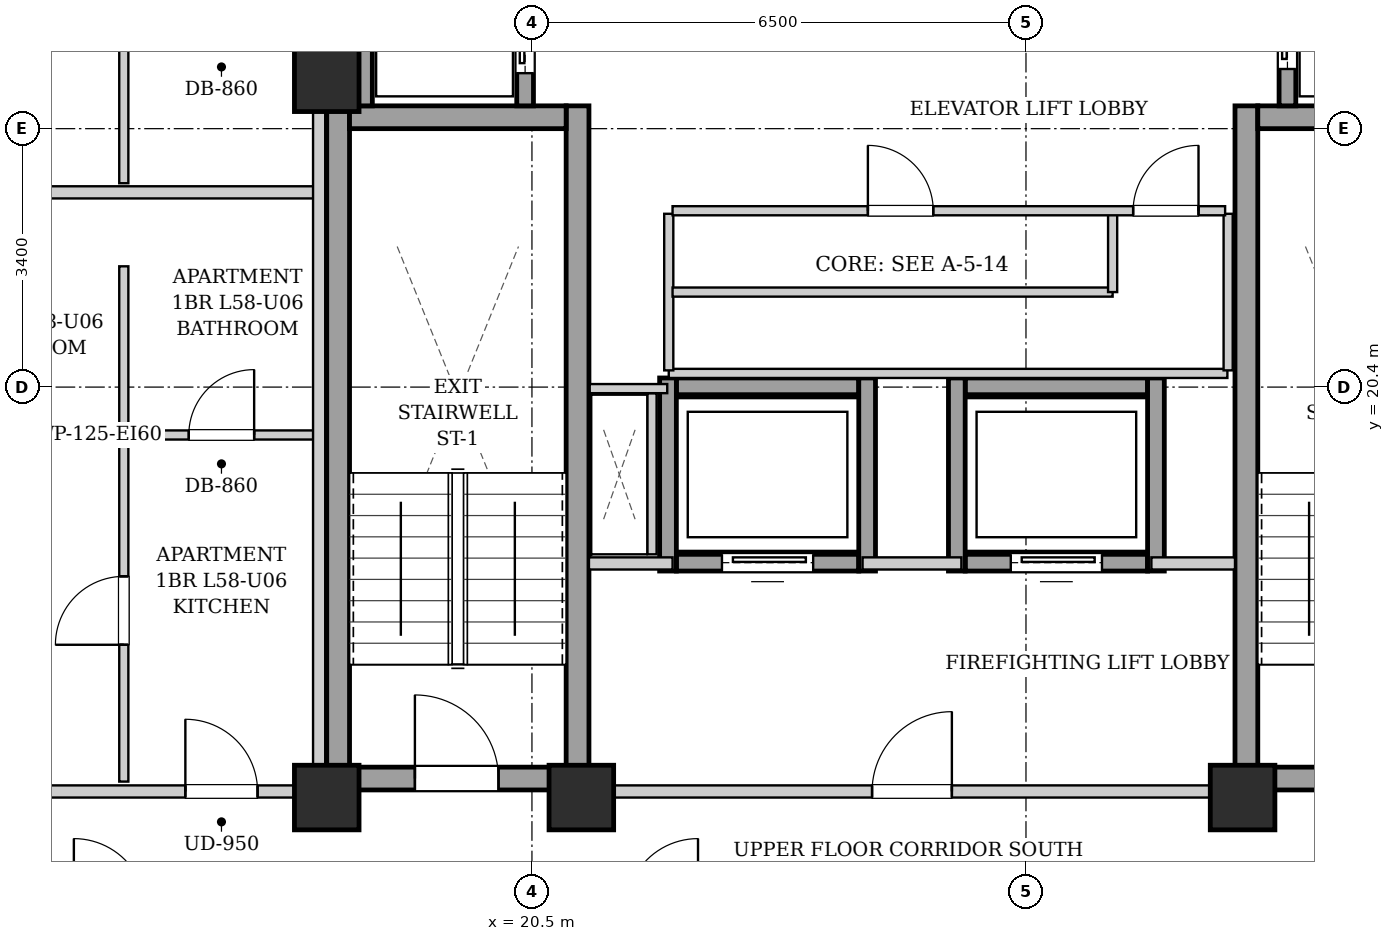
"""IFC4 building model, lengths in metres.
Left out: names, types, materials, properties, quantities, classifications, styles, units other than length and angle.
Written with IfcOpenShell. Run it as: python <this file> out.ifc"""

import sys

from ifc_helpers import new_model, si_unit, direction, frame, frame_2d, origin, origin_2d, place, context, subcontext, project, spatial, rectangle, extrude, element, fill, save


model = new_model("IFC4")
c1 = context("Model", 3, precision=1e-05, world=origin(), true_north=direction((0.0, 1.0)))
c2 = subcontext(c1, "Body", "Model", "MODEL_VIEW")
j1 = project(units=[si_unit("LENGTHUNIT", "METRE"), si_unit("PLANEANGLEUNIT", "RADIAN")], contexts=[c1])
p1 = place(None, origin())
s1 = spatial("IfcSite", under=j1, at=p1, CompositionType="ELEMENT")
p2 = place(p1, origin())
s2 = spatial("IfcBuilding", under=s1, at=p2, CompositionType="ELEMENT")
p3 = place(p2, frame((0.0, 0.0, 200.8)))
s3 = spatial("IfcBuildingStorey", under=s2, at=p3, CompositionType="ELEMENT", Elevation=200.8)
for number, where, z_axis, x_axis in (
    (1, (17.8, 15.0, 0.0), (0.0, 0.0, 1.0), (1.0, 0.0, 0.0)),
    (2, (21.15, 15.0, 0.0), (0.0, 0.0, 1.0), (1.0, 0.0, 0.0)),
    (3, (29.85, 15.0, 0.0), (0.0, 0.0, 1.0), (1.0, 0.0, 0.0)),
    (4, (17.8, 24.45, 0.0), (0.0, 0.0, 1.0), (1.0, 0.0, 0.0)),
):
    element("IfcColumn", number, at=place(p3, frame(where, z_axis=z_axis, x_axis=x_axis)), inside=s3, PredefinedType="COLUMN", context=c2, shape_type="SweptSolid", body=[
        extrude(rectangle(XDim=0.85, YDim=0.85, at=origin_2d()), origin(), (0.0, 0.0, 1.0), 3.3),
    ])
for number, where, z_axis, x_axis in (
    (5, (17.95, 15.1, 0.0), (0.0, 0.0, 1.0), (0.0, 1.0, 0.0)),
    (6, (21.1, 15.1, 0.0), (0.0, 0.0, 1.0), (0.0, 1.0, 0.0)),
):
    element("IfcWall", number, at=place(p3, frame(where, z_axis=z_axis, x_axis=x_axis)), inside=s3, PredefinedType="SHEAR", context=c2, shape_type="SweptSolid", body=[
        extrude(rectangle(XDim=9.0, YDim=0.3, at=frame_2d((4.5, 0.0))), origin(), (0.0, 0.0, 1.0), 3.04),
    ])
p4 = place(p3, frame((18.1, 23.95, 0.0), z_axis=(0.0, 0.0, 1.0), x_axis=(1.0, 0.0, 0.0)))
e7 = element("IfcWall", 7, at=p4, inside=s3, PredefinedType="SHEAR", context=c2, shape_type="SweptSolid", body=[
    extrude(rectangle(XDim=2.85, YDim=0.3, at=frame_2d((1.425, 0.0))), origin(), (0.0, 0.0, 1.0), 3.04),
])
p5 = place(p3, frame((18.1, 15.25, 0.0), z_axis=(0.0, 0.0, 1.0), x_axis=(1.0, 0.0, 0.0)))
e8 = element("IfcWall", 8, at=p5, inside=s3, PredefinedType="SHEAR", context=c2, shape_type="SweptSolid", body=[
    extrude(rectangle(XDim=2.85, YDim=0.3, at=frame_2d((1.425, 0.0))), origin(), (0.0, 0.0, 1.0), 3.04),
])
p6 = place(p5, frame((0.86, 0.0, 0.0)))
e9 = element("IfcOpeningElement", 9, at=p6, cuts=e8, PredefinedType="OPENING", context=c2, shape_type="SweptSolid", body=[
    extrude(rectangle(XDim=1.1, YDim=2.05, at=frame_2d((0.55, 1.025))), frame((0.0, 0.16, 0.0), z_axis=(0.0, -1.0, 0.0), x_axis=(1.0, 0.0, 0.0)), (0.0, 0.0, 1.0), 0.32),
])
p7 = place(p3, frame((29.9, 15.1, 0.0), z_axis=(0.0, 0.0, 1.0), x_axis=(0.0, 1.0, 0.0)))
e10 = element("IfcWall", 10, at=p7, inside=s3, PredefinedType="SHEAR", context=c2, shape_type="SweptSolid", body=[
    extrude(rectangle(XDim=9.0, YDim=0.3, at=frame_2d((4.5, 0.0))), origin(), (0.0, 0.0, 1.0), 3.04),
])
p8 = place(p3, frame((30.05, 23.95, 0.0), z_axis=(0.0, 0.0, 1.0), x_axis=(1.0, 0.0, 0.0)))
e11 = element("IfcWall", 11, at=p8, inside=s3, PredefinedType="SHEAR", context=c2, shape_type="SweptSolid", body=[
    extrude(rectangle(XDim=2.85, YDim=0.3, at=frame_2d((1.425, 0.0))), origin(), (0.0, 0.0, 1.0), 3.04),
])
p9 = place(p3, frame((30.05, 15.25, 0.0), z_axis=(0.0, 0.0, 1.0), x_axis=(1.0, 0.0, 0.0)))
e12 = element("IfcWall", 12, at=p9, inside=s3, PredefinedType="SHEAR", context=c2, shape_type="SweptSolid", body=[
    extrude(rectangle(XDim=2.85, YDim=0.3, at=frame_2d((1.425, 0.0))), origin(), (0.0, 0.0, 1.0), 3.04),
])
p10 = place(p9, frame((0.86, 0.0, 0.0)))
e13 = element("IfcOpeningElement", 13, at=p10, cuts=e12, PredefinedType="OPENING", context=c2, shape_type="SweptSolid", body=[
    extrude(rectangle(XDim=1.1, YDim=2.05, at=frame_2d((0.55, 1.025))), frame((0.0, 0.16, 0.0), z_axis=(0.0, -1.0, 0.0), x_axis=(1.0, 0.0, 0.0)), (0.0, 0.0, 1.0), 0.32),
])
p11 = place(p3, frame((18.29, 24.1, 0.0), z_axis=(0.0, 0.0, 1.0), x_axis=(0.0, 1.0, 0.0)))
e14 = element("IfcWall", 14, at=p11, inside=s3, PredefinedType="SHEAR", context=c2, shape_type="SweptSolid", body=[
    extrude(rectangle(XDim=4.14, YDim=0.22, at=frame_2d((2.07, 0.0))), origin(), (0.0, 0.0, 1.0), 3.04),
])
p12 = place(p3, frame((20.41, 24.1, 0.0), z_axis=(0.0, 0.0, 1.0), x_axis=(0.0, 1.0, 0.0)))
e15 = element("IfcWall", 15, at=p12, inside=s3, PredefinedType="SHEAR", context=c2, shape_type="SweptSolid", body=[
    extrude(rectangle(XDim=1.96, YDim=0.22, at=frame_2d((0.98, 0.0))), origin(), (0.0, 0.0, 1.0), 3.04),
])
p13 = place(p12, frame((0.43, 0.0, 0.0)))
e16 = element("IfcOpeningElement", 16, at=p13, cuts=e15, PredefinedType="OPENING", context=c2, shape_type="SweptSolid", body=[
    extrude(rectangle(XDim=1.1, YDim=2.15, at=frame_2d((0.55, 1.075))), frame((0.0, 0.12, 0.0), z_axis=(0.0, -1.0, 0.0), x_axis=(1.0, 0.0, 0.0)), (0.0, 0.0, 1.0), 0.24),
])
p14 = place(p3, frame((30.44, 24.1, 0.0), z_axis=(0.0, 0.0, 1.0), x_axis=(0.0, 1.0, 0.0)))
e17 = element("IfcWall", 17, at=p14, inside=s3, PredefinedType="SHEAR", context=c2, shape_type="SweptSolid", body=[
    extrude(rectangle(XDim=2.07, YDim=0.22, at=frame_2d((1.035, 0.0))), origin(), (0.0, 0.0, 1.0), 3.04),
])
p15 = place(p14, frame((0.485, 0.0, 0.0)))
e18 = element("IfcOpeningElement", 18, at=p15, cuts=e17, PredefinedType="OPENING", context=c2, shape_type="SweptSolid", body=[
    extrude(rectangle(XDim=1.1, YDim=2.15, at=frame_2d((0.55, 1.075))), frame((0.0, 0.12, 0.0), z_axis=(0.0, -1.0, 0.0), x_axis=(1.0, 0.0, 0.0)), (0.0, 0.0, 1.0), 0.24),
])
p16 = place(p3, frame((22.4, 18.09, 0.0), z_axis=(0.0, 0.0, 1.0), x_axis=(1.0, 0.0, 0.0)))
e19 = element("IfcWall", 19, at=p16, inside=s3, PredefinedType="SHEAR", context=c2, shape_type="SweptSolid", body=[
    extrude(rectangle(XDim=2.4, YDim=0.22, at=frame_2d((1.2, 0.0))), origin(), (0.0, 0.0, 1.0), 3.04),
])
p17 = place(p16, frame((0.6, 0.0, 0.0)))
e20 = element("IfcOpeningElement", 20, at=p17, cuts=e19, PredefinedType="OPENING", context=c2, shape_type="SweptSolid", body=[
    extrude(rectangle(XDim=1.2, YDim=2.15, at=frame_2d((0.6, 1.075))), frame((0.0, 0.12, 0.0), z_axis=(0.0, -1.0, 0.0), x_axis=(1.0, 0.0, 0.0)), (0.0, 0.0, 1.0), 0.24),
])
p18 = place(p3, frame((22.4, 20.41, 0.0), z_axis=(0.0, 0.0, 1.0), x_axis=(1.0, 0.0, 0.0)))
e21 = element("IfcWall", 21, at=p18, inside=s3, PredefinedType="SHEAR", context=c2, shape_type="SweptSolid", body=[
    extrude(rectangle(XDim=2.4, YDim=0.22, at=frame_2d((1.2, 0.0))), origin(), (0.0, 0.0, 1.0), 3.04),
])
for number, where, z_axis, x_axis in (
    (22, (22.29, 17.98, 0.0), (0.0, 0.0, 1.0), (0.0, 1.0, 0.0)),
    (23, (24.91, 17.98, 0.0), (0.0, 0.0, 1.0), (0.0, 1.0, 0.0)),
):
    element("IfcWall", number, at=place(p3, frame(where, z_axis=z_axis, x_axis=x_axis)), inside=s3, PredefinedType="SHEAR", context=c2, shape_type="SweptSolid", body=[
        extrude(rectangle(XDim=2.54, YDim=0.22, at=frame_2d((1.27, 0.0))), origin(), (0.0, 0.0, 1.0), 3.04),
    ])
p19 = place(p3, frame((26.2, 18.09, 0.0), z_axis=(0.0, 0.0, 1.0), x_axis=(1.0, 0.0, 0.0)))
e24 = element("IfcWall", 24, at=p19, inside=s3, PredefinedType="SHEAR", context=c2, shape_type="SweptSolid", body=[
    extrude(rectangle(XDim=2.4, YDim=0.22, at=frame_2d((1.2, 0.0))), origin(), (0.0, 0.0, 1.0), 3.04),
])
p20 = place(p19, frame((0.6, 0.0, 0.0)))
e25 = element("IfcOpeningElement", 25, at=p20, cuts=e24, PredefinedType="OPENING", context=c2, shape_type="SweptSolid", body=[
    extrude(rectangle(XDim=1.2, YDim=2.15, at=frame_2d((0.6, 1.075))), frame((0.0, 0.12, 0.0), z_axis=(0.0, -1.0, 0.0), x_axis=(1.0, 0.0, 0.0)), (0.0, 0.0, 1.0), 0.24),
])
p21 = place(p3, frame((26.2, 20.41, 0.0), z_axis=(0.0, 0.0, 1.0), x_axis=(1.0, 0.0, 0.0)))
e26 = element("IfcWall", 26, at=p21, inside=s3, PredefinedType="SHEAR", context=c2, shape_type="SweptSolid", body=[
    extrude(rectangle(XDim=2.4, YDim=0.22, at=frame_2d((1.2, 0.0))), origin(), (0.0, 0.0, 1.0), 3.04),
])
for number, where, z_axis, x_axis in (
    (27, (26.09, 17.98, 0.0), (0.0, 0.0, 1.0), (0.0, 1.0, 0.0)),
    (28, (28.71, 17.98, 0.0), (0.0, 0.0, 1.0), (0.0, 1.0, 0.0)),
):
    element("IfcWall", number, at=place(p3, frame(where, z_axis=z_axis, x_axis=x_axis)), inside=s3, PredefinedType="SHEAR", context=c2, shape_type="SweptSolid", body=[
        extrude(rectangle(XDim=2.54, YDim=0.22, at=frame_2d((1.27, 0.0))), origin(), (0.0, 0.0, 1.0), 3.04),
    ])
p22 = place(p3, frame((21.25, 15.08, 0.0), z_axis=(0.0, 0.0, 1.0), x_axis=(1.0, 0.0, 0.0)))
e29 = element("IfcWall", 29, at=p22, inside=s3, PredefinedType="PARTITIONING", context=c2, shape_type="SweptSolid", body=[
    extrude(rectangle(XDim=8.5, YDim=0.16, at=frame_2d((4.25, 0.0))), origin(), (0.0, 0.0, 1.0), 2.556),
])
p23 = place(p22, frame((3.725, 0.0, 0.0)))
e30 = element("IfcOpeningElement", 30, at=p23, cuts=e29, PredefinedType="OPENING", context=c2, shape_type="SweptSolid", body=[
    extrude(rectangle(XDim=1.05, YDim=2.05, at=frame_2d((0.525, 1.025))), frame((0.0, 0.09, 0.0), z_axis=(0.0, -1.0, 0.0), x_axis=(1.0, 0.0, 0.0)), (0.0, 0.0, 1.0), 0.18),
])
p24 = place(p3, frame((21.25, 18.08, 0.0), z_axis=(0.0, 0.0, 1.0), x_axis=(1.0, 0.0, 0.0)))
e31 = element("IfcWall", 31, at=p24, inside=s3, PredefinedType="PARTITIONING", context=c2, shape_type="SweptSolid", body=[
    extrude(rectangle(XDim=1.1, YDim=0.16, at=frame_2d((0.55, 0.0))), origin(), (0.0, 0.0, 1.0), 3.04),
])
p25 = place(p3, frame((24.85, 18.08, 0.0), z_axis=(0.0, 0.0, 1.0), x_axis=(1.0, 0.0, 0.0)))
e32 = element("IfcWall", 32, at=p25, inside=s3, PredefinedType="PARTITIONING", context=c2, shape_type="SweptSolid", body=[
    extrude(rectangle(XDim=1.3, YDim=0.16, at=frame_2d((0.65, 0.0))), origin(), (0.0, 0.0, 1.0), 3.04),
])
p26 = place(p3, frame((28.65, 18.08, 0.0), z_axis=(0.0, 0.0, 1.0), x_axis=(1.0, 0.0, 0.0)))
e33 = element("IfcWall", 33, at=p26, inside=s3, PredefinedType="PARTITIONING", context=c2, shape_type="SweptSolid", body=[
    extrude(rectangle(XDim=1.1, YDim=0.16, at=frame_2d((0.55, 0.0))), origin(), (0.0, 0.0, 1.0), 3.04),
])
p27 = place(p3, frame((17.88, 24.12, 0.0), z_axis=(0.0, 0.0, 1.0), x_axis=(0.0, 1.0, 0.0)))
e34 = element("IfcWall", 34, at=p27, inside=s3, PredefinedType="PARTITIONING", context=c2, shape_type="SweptSolid", body=[
    extrude(rectangle(XDim=4.76, YDim=0.16, at=frame_2d((2.38, 0.0))), origin(), (0.0, 0.0, 1.0), 3.04),
])
p28 = place(p3, frame((22.08, 18.2, 0.0), z_axis=(0.0, 0.0, 1.0), x_axis=(0.0, 1.0, 0.0)))
e35 = element("IfcWall", 35, at=p28, inside=s3, PredefinedType="PARTITIONING", context=c2, shape_type="SweptSolid", body=[
    extrude(rectangle(XDim=2.12, YDim=0.12, at=frame_2d((1.06, 0.0))), origin(), (0.0, 0.0, 1.0), 3.04),
])
p29 = place(p3, frame((22.28, 20.38, 0.0), z_axis=(0.0, 0.0, 1.0), x_axis=(-1.0, 0.0, 0.0)))
e36 = element("IfcWall", 36, at=p29, inside=s3, PredefinedType="PARTITIONING", context=c2, shape_type="SweptSolid", body=[
    extrude(rectangle(XDim=1.02, YDim=0.12, at=frame_2d((0.51, 0.0))), origin(), (0.0, 0.0, 1.0), 3.04),
])
p30 = place(p3, frame((22.3, 20.58, 0.0), z_axis=(0.0, 0.0, 1.0), x_axis=(1.0, 0.0, 0.0)))
e37 = element("IfcWall", 37, at=p30, inside=s3, PredefinedType="PARTITIONING", context=c2, shape_type="SweptSolid", body=[
    extrude(rectangle(XDim=7.35, YDim=0.12, at=frame_2d((3.675, 0.0))), origin(), (0.0, 0.0, 1.0), 3.04),
])
for number, where, z_axis, x_axis in (
    (38, (22.3, 20.62, 0.0), (0.0, 0.0, 1.0), (0.0, 1.0, 0.0)),
    (39, (29.66, 20.62, 0.0), (0.0, 0.0, 1.0), (0.0, 1.0, 0.0)),
):
    element("IfcWall", number, at=place(p3, frame(where, z_axis=z_axis, x_axis=x_axis)), inside=s3, PredefinedType="PARTITIONING", context=c2, shape_type="SweptSolid", body=[
        extrude(rectangle(XDim=2.06, YDim=0.12, at=frame_2d((1.03, 0.0))), origin(), (0.0, 0.0, 1.0), 3.04),
    ])
p31 = place(p3, frame((22.35, 21.65, 0.0), z_axis=(0.0, 0.0, 1.0), x_axis=(1.0, 0.0, 0.0)))
e40 = element("IfcWall", 40, at=p31, inside=s3, PredefinedType="PARTITIONING", context=c2, shape_type="SweptSolid", body=[
    extrude(rectangle(XDim=5.79, YDim=0.12, at=frame_2d((2.895, 0.0))), origin(), (0.0, 0.0, 1.0), 3.04),
])
p32 = place(p3, frame((28.14, 21.65, 0.0), z_axis=(0.0, 0.0, 1.0), x_axis=(0.0, 1.0, 0.0)))
e41 = element("IfcWall", 41, at=p32, inside=s3, PredefinedType="PARTITIONING", context=c2, shape_type="SweptSolid", body=[
    extrude(rectangle(XDim=1.03, YDim=0.12, at=frame_2d((0.515, 0.0))), origin(), (0.0, 0.0, 1.0), 3.04),
])
p33 = place(p3, frame((22.35, 22.72, 0.0), z_axis=(0.0, 0.0, 1.0), x_axis=(1.0, 0.0, 0.0)))
e42 = element("IfcWall", 42, at=p33, inside=s3, PredefinedType="PARTITIONING", context=c2, shape_type="SweptSolid", body=[
    extrude(rectangle(XDim=7.27, YDim=0.12, at=frame_2d((3.635, 0.0))), origin(), (0.0, 0.0, 1.0), 3.04),
])
p34 = place(p33, frame((2.57, 0.0, 0.0)))
e43 = element("IfcOpeningElement", 43, at=p34, cuts=e42, PredefinedType="OPENING", context=c2, shape_type="SweptSolid", body=[
    extrude(rectangle(XDim=0.86, YDim=2.05, at=frame_2d((0.43, 1.025))), frame((0.0, 0.07, 0.0), z_axis=(0.0, -1.0, 0.0), x_axis=(1.0, 0.0, 0.0)), (0.0, 0.0, 1.0), 0.14),
])
p35 = place(p33, frame((6.06, 0.0, 0.0)))
e44 = element("IfcOpeningElement", 44, at=p35, cuts=e42, PredefinedType="OPENING", context=c2, shape_type="SweptSolid", body=[
    extrude(rectangle(XDim=0.86, YDim=2.05, at=frame_2d((0.43, 1.025))), frame((0.0, 0.07, 0.0), z_axis=(0.0, -1.0, 0.0), x_axis=(1.0, 0.0, 0.0)), (0.0, 0.0, 1.0), 0.14),
])
p36 = place(p3, frame((10.88, 15.08, 0.0), z_axis=(0.0, 0.0, 1.0), x_axis=(1.0, 0.0, 0.0)))
e45 = element("IfcWall", 45, at=p36, inside=s3, PredefinedType="PARTITIONING", context=c2, shape_type="SweptSolid", body=[
    extrude(rectangle(XDim=6.88, YDim=0.16, at=frame_2d((3.44, 0.0))), origin(), (0.0, 0.0, 1.0), 2.556),
])
p37 = place(p36, frame((5.06, 0.0, 0.0)))
e46 = element("IfcOpeningElement", 46, at=p37, cuts=e45, PredefinedType="OPENING", context=c2, shape_type="SweptSolid", body=[
    extrude(rectangle(XDim=0.95, YDim=2.1, at=frame_2d((0.475, 1.05))), frame((0.0, 0.09, 0.0), z_axis=(0.0, -1.0, 0.0), x_axis=(1.0, 0.0, 0.0)), (0.0, 0.0, 1.0), 0.18),
])
p38 = place(p3, frame((10.88, 22.962, 0.0), z_axis=(0.0, 0.0, 1.0), x_axis=(1.0, 0.0, 0.0)))
e47 = element("IfcWall", 47, at=p38, inside=s3, PredefinedType="PARTITIONING", context=c2, shape_type="SweptSolid", body=[
    extrude(rectangle(XDim=6.76, YDim=0.16, at=frame_2d((3.38, 0.0))), origin(), (0.0, 0.0, 1.0), 3.04),
])
p39 = place(p3, frame((15.19, 19.77, 0.0), z_axis=(0.0, 0.0, 1.0), x_axis=(1.0, 0.0, 0.0)))
e48 = element("IfcWall", 48, at=p39, inside=s3, PredefinedType="PARTITIONING", context=c2, shape_type="SweptSolid", body=[
    extrude(rectangle(XDim=2.45, YDim=0.12, at=frame_2d((1.225, 0.0))), origin(), (0.0, 0.0, 1.0), 3.04),
])
p40 = place(p39, frame((0.795, 0.0, 0.0)))
e49 = element("IfcOpeningElement", 49, at=p40, cuts=e48, PredefinedType="OPENING", context=c2, shape_type="SweptSolid", body=[
    extrude(rectangle(XDim=0.86, YDim=2.05, at=frame_2d((0.43, 1.025))), frame((0.0, 0.07, 0.0), z_axis=(0.0, -1.0, 0.0), x_axis=(1.0, 0.0, 0.0)), (0.0, 0.0, 1.0), 0.14),
])
p41 = place(p3, frame((15.13, 19.83, 0.0), z_axis=(0.0, 0.0, 1.0), x_axis=(0.0, 1.0, 0.0)))
e50 = element("IfcWall", 50, at=p41, inside=s3, PredefinedType="PARTITIONING", context=c2, shape_type="SweptSolid", body=[
    extrude(rectangle(XDim=2.159, YDim=0.12, at=frame_2d((1.08, 0.0))), origin(), (0.0, 0.0, 1.0), 3.04),
])
p42 = place(p3, frame((15.13, 15.21, 0.0), z_axis=(0.0, 0.0, 1.0), x_axis=(0.0, 1.0, 0.0)))
e51 = element("IfcWall", 51, at=p42, inside=s3, PredefinedType="PARTITIONING", context=c2, shape_type="SweptSolid", body=[
    extrude(rectangle(XDim=4.5, YDim=0.12, at=frame_2d((2.25, 0.0))), origin(), (0.0, 0.0, 1.0), 3.04),
])
p43 = place(p42, frame((1.8, 0.0, 0.0)))
e52 = element("IfcOpeningElement", 52, at=p43, cuts=e51, PredefinedType="OPENING", context=c2, shape_type="SweptSolid", body=[
    extrude(rectangle(XDim=0.9, YDim=2.05, at=frame_2d((0.45, 1.025))), frame((0.0, 0.07, 0.0), z_axis=(0.0, -1.0, 0.0), x_axis=(1.0, 0.0, 0.0)), (0.0, 0.0, 1.0), 0.14),
])
p44 = place(p3, frame((15.13, 23.082, 0.0), z_axis=(0.0, 0.0, 1.0), x_axis=(0.0, 1.0, 0.0)))
e53 = element("IfcWall", 53, at=p44, inside=s3, PredefinedType="PARTITIONING", context=c2, shape_type="SweptSolid", body=[
    extrude(rectangle(XDim=1.85, YDim=0.12, at=frame_2d((0.925, 0.0))), origin(), (0.0, 0.0, 1.0), 3.04),
])
p45 = place(p3, frame((17.7, 15.02, 0.0), z_axis=(0.0, 0.0, 1.0), x_axis=(0.0, 1.0, 0.0)))
e54 = element("IfcWall", 54, at=p45, inside=s3, PredefinedType="PARTITIONING", context=c2, shape_type="SweptSolid", body=[
    extrude(rectangle(XDim=13.98, YDim=0.16, at=frame_2d((6.99, 0.0))), origin(), (0.0, 0.0, 1.0), 3.04),
])
p46 = place(p6, origin())
e55 = element("IfcDoor", 55, at=p46, inside=s3, OperationType="SINGLE_SWING_LEFT", PredefinedType="DOOR", context=c2, shape_type="SweptSolid", body=[
    extrude(rectangle(XDim=1.1, YDim=2.05, at=frame_2d((0.55, 1.025))), frame((0.0, 0.025, 0.0), z_axis=(0.0, -1.0, 0.0), x_axis=(1.0, 0.0, 0.0)), (0.0, 0.0, 1.0), 0.05),
])
fill(e9, e55)
p47 = place(p13, origin())
e56 = element("IfcDoor", 56, at=p47, inside=s3, OperationType="SLIDING_TO_LEFT", PredefinedType="DOOR", context=c2, shape_type="SweptSolid", body=[
    extrude(rectangle(XDim=1.1, YDim=2.15, at=frame_2d((0.55, 1.075))), frame((0.0, 0.025, 0.0), z_axis=(0.0, -1.0, 0.0), x_axis=(1.0, 0.0, 0.0)), (0.0, 0.0, 1.0), 0.05),
])
fill(e16, e56)
p48 = place(p15, origin())
e57 = element("IfcDoor", 57, at=p48, inside=s3, OperationType="SLIDING_TO_LEFT", PredefinedType="DOOR", context=c2, shape_type="SweptSolid", body=[
    extrude(rectangle(XDim=1.1, YDim=2.15, at=frame_2d((0.55, 1.075))), frame((0.0, 0.025, 0.0), z_axis=(0.0, -1.0, 0.0), x_axis=(1.0, 0.0, 0.0)), (0.0, 0.0, 1.0), 0.05),
])
fill(e18, e57)
p49 = place(p17, origin())
e58 = element("IfcDoor", 58, at=p49, inside=s3, OperationType="SLIDING_TO_LEFT", PredefinedType="DOOR", context=c2, shape_type="SweptSolid", body=[
    extrude(rectangle(XDim=1.2, YDim=2.15, at=frame_2d((0.6, 1.075))), frame((0.0, 0.025, 0.0), z_axis=(0.0, -1.0, 0.0), x_axis=(1.0, 0.0, 0.0)), (0.0, 0.0, 1.0), 0.05),
])
fill(e20, e58)
p50 = place(p20, origin())
e59 = element("IfcDoor", 59, at=p50, inside=s3, OperationType="SLIDING_TO_LEFT", PredefinedType="DOOR", context=c2, shape_type="SweptSolid", body=[
    extrude(rectangle(XDim=1.2, YDim=2.15, at=frame_2d((0.6, 1.075))), frame((0.0, 0.025, 0.0), z_axis=(0.0, -1.0, 0.0), x_axis=(1.0, 0.0, 0.0)), (0.0, 0.0, 1.0), 0.05),
])
fill(e25, e59)
p51 = place(p23, origin())
e60 = element("IfcDoor", 60, at=p51, inside=s3, OperationType="SINGLE_SWING_RIGHT", PredefinedType="DOOR", context=c2, shape_type="SweptSolid", body=[
    extrude(rectangle(XDim=1.05, YDim=2.05, at=frame_2d((0.525, 1.025))), frame((0.0, 0.025, 0.0), z_axis=(0.0, -1.0, 0.0), x_axis=(1.0, 0.0, 0.0)), (0.0, 0.0, 1.0), 0.05),
])
fill(e30, e60)
p52 = place(p34, origin())
e61 = element("IfcDoor", 61, at=p52, inside=s3, OperationType="SINGLE_SWING_LEFT", PredefinedType="DOOR", context=c2, shape_type="SweptSolid", body=[
    extrude(rectangle(XDim=0.86, YDim=2.05, at=frame_2d((0.43, 1.025))), frame((0.0, 0.025, 0.0), z_axis=(0.0, -1.0, 0.0), x_axis=(1.0, 0.0, 0.0)), (0.0, 0.0, 1.0), 0.05),
])
fill(e43, e61)
p53 = place(p35, origin())
e62 = element("IfcDoor", 62, at=p53, inside=s3, OperationType="SINGLE_SWING_RIGHT", PredefinedType="DOOR", context=c2, shape_type="SweptSolid", body=[
    extrude(rectangle(XDim=0.86, YDim=2.05, at=frame_2d((0.43, 1.025))), frame((0.0, 0.025, 0.0), z_axis=(0.0, -1.0, 0.0), x_axis=(1.0, 0.0, 0.0)), (0.0, 0.0, 1.0), 0.05),
])
fill(e44, e62)
p54 = place(p37, origin())
e63 = element("IfcDoor", 63, at=p54, inside=s3, OperationType="SINGLE_SWING_LEFT", PredefinedType="DOOR", context=c2, shape_type="SweptSolid", body=[
    extrude(rectangle(XDim=0.95, YDim=2.1, at=frame_2d((0.475, 1.05))), frame((0.0, 0.025, 0.0), z_axis=(0.0, -1.0, 0.0), x_axis=(1.0, 0.0, 0.0)), (0.0, 0.0, 1.0), 0.05),
])
fill(e46, e63)
p55 = place(p40, origin())
e64 = element("IfcDoor", 64, at=p55, inside=s3, OperationType="SINGLE_SWING_RIGHT", PredefinedType="DOOR", context=c2, shape_type="SweptSolid", body=[
    extrude(rectangle(XDim=0.86, YDim=2.05, at=frame_2d((0.43, 1.025))), frame((0.0, 0.025, 0.0), z_axis=(0.0, -1.0, 0.0), x_axis=(1.0, 0.0, 0.0)), (0.0, 0.0, 1.0), 0.05),
])
fill(e49, e64)
p56 = place(p43, origin())
e65 = element("IfcDoor", 65, at=p56, inside=s3, OperationType="SINGLE_SWING_LEFT", PredefinedType="DOOR", context=c2, shape_type="SweptSolid", body=[
    extrude(rectangle(XDim=0.9, YDim=2.05, at=frame_2d((0.45, 1.025))), frame((0.0, 0.025, 0.0), z_axis=(0.0, -1.0, 0.0), x_axis=(1.0, 0.0, 0.0)), (0.0, 0.0, 1.0), 0.05),
])
fill(e52, e65)
save(model, sys.argv[1])
